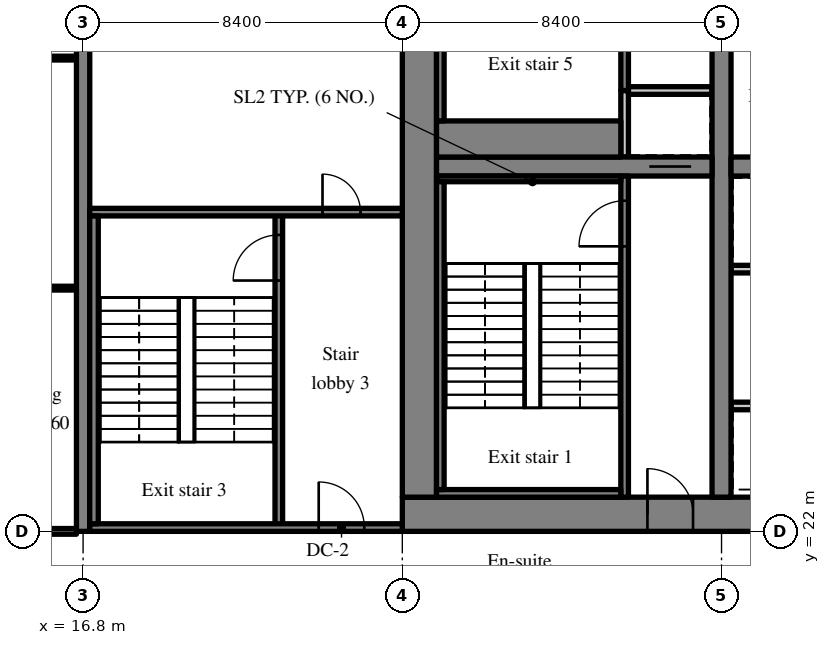
"""IFC4 building model, lengths in metres.
Left out: names, types, materials, properties, quantities, classifications, styles, units other than length and angle.
Written with IfcOpenShell. Run it as: python <this file> out.ifc"""

import sys

from ifc_helpers import new_model, si_unit, direction, frame, frame_2d, origin, place, context, subcontext, project, spatial, rectangle, extrude, source, transform, mapped, element, fill, save


model = new_model("IFC4")
c1 = context("Model", 3, precision=1e-05, world=origin(), true_north=direction((0.0, 1.0)))
c2 = subcontext(c1, "Body", "Model", "MODEL_VIEW")
j1 = project(units=[si_unit("LENGTHUNIT", "METRE"), si_unit("PLANEANGLEUNIT", "RADIAN")], contexts=[c1])
p1 = place(None, origin())
s1 = spatial("IfcSite", under=j1, at=p1, CompositionType="ELEMENT")
p2 = place(p1, origin())
s2 = spatial("IfcBuilding", under=s1, at=p2, CompositionType="ELEMENT")
p3 = place(p2, frame((0.0, 0.0, 133.2)))
s3 = spatial("IfcBuildingStorey", under=s2, at=p3, CompositionType="ELEMENT", Elevation=133.2)
m1 = source(origin(), c2, "Body", "SweptSolid", [
    extrude(rectangle(XDim=50.4, YDim=0.9, at=frame_2d((25.2, 0.0))), origin(), (0.0, 0.0, 1.0), 3.52),
])
p4 = place(p3, frame((25.2, 22.45, 0.0), z_axis=(0.0, 0.0, 1.0), x_axis=(1.0, 0.0, 0.0)))
e1 = element("IfcWall", 1, at=p4, inside=s3, PredefinedType="SHEAR", context=c2, shape_type="MappedRepresentation", body=[
    mapped(m1, transform((0.0, 0.0, 0.0), scale=1.0)),
])
m2 = source(origin(), c2, "Body", "SweptSolid", [
    extrude(rectangle(XDim=1.8, YDim=2.1, at=frame_2d((0.9, 1.05))), frame((0.0, 0.46, 0.0), z_axis=(0.0, -1.0, 0.0), x_axis=(1.0, 0.0, 0.0)), (0.0, 0.0, 1.0), 0.92),
])
p5 = place(p4, frame((15.9, 0.0, 0.0)))
e2 = element("IfcOpeningElement", 2, at=p5, cuts=e1, PredefinedType="OPENING", context=c2, shape_type="MappedRepresentation", body=[
    mapped(m2, transform((0.0, 0.0, 0.0), scale=1.0)),
])
m3 = source(origin(), c2, "Body", "SweptSolid", [
    extrude(rectangle(XDim=1.2, YDim=2.1, at=frame_2d((0.6, 1.05))), frame((0.0, 0.46, 0.0), z_axis=(0.0, -1.0, 0.0), x_axis=(1.0, 0.0, 0.0)), (0.0, 0.0, 1.0), 0.92),
])
p6 = place(p4, frame((26.975, 0.0, 0.0)))
e3 = element("IfcOpeningElement", 3, at=p6, cuts=e1, PredefinedType="OPENING", context=c2, shape_type="MappedRepresentation", body=[
    mapped(m3, transform((0.0, 0.0, 0.0), scale=1.0)),
])
m4 = source(origin(), c2, "Body", "SweptSolid", [
    extrude(rectangle(XDim=0.9, YDim=2.1, at=frame_2d((0.45, 1.05))), frame((0.0, 0.46, 0.0), z_axis=(0.0, -1.0, 0.0), x_axis=(1.0, 0.0, 0.0)), (0.0, 0.0, 1.0), 0.92),
])
p7 = place(p4, frame((34.5, 0.0, 0.0)))
e4 = element("IfcOpeningElement", 4, at=p7, cuts=e1, PredefinedType="OPENING", context=c2, shape_type="MappedRepresentation", body=[
    mapped(m4, transform((0.0, 0.0, 0.0), scale=1.0)),
])
p8 = place(p4, frame((31.5, 0.0, 0.0)))
e5 = element("IfcOpeningElement", 5, at=p8, cuts=e1, PredefinedType="OPENING", context=c2, shape_type="MappedRepresentation", body=[
    mapped(m4, transform((0.0, 0.0, 0.0), scale=1.0)),
])
p9 = place(p4, frame((39.788, 0.0, 0.0)))
e6 = element("IfcOpeningElement", 6, at=p9, cuts=e1, PredefinedType="OPENING", context=c2, shape_type="MappedRepresentation", body=[
    mapped(m4, transform((0.0, 0.0, 0.0), scale=1.0)),
])
p10 = place(p4, frame((36.762, 0.0, 0.0)))
e7 = element("IfcOpeningElement", 7, at=p10, cuts=e1, PredefinedType="OPENING", context=c2, shape_type="MappedRepresentation", body=[
    mapped(m4, transform((0.0, 0.0, 0.0), scale=1.0)),
])
p11 = place(p4, frame((6.45, 0.0, 0.0)))
e8 = element("IfcOpeningElement", 8, at=p11, cuts=e1, PredefinedType="OPENING", context=c2, shape_type="MappedRepresentation", body=[
    mapped(m3, transform((0.0, 0.0, 0.0), scale=1.0)),
])
p12 = place(p4, frame((47.775, 0.0, 0.0)))
e9 = element("IfcOpeningElement", 9, at=p12, cuts=e1, PredefinedType="OPENING", context=c2, shape_type="MappedRepresentation", body=[
    mapped(m3, transform((0.0, 0.0, 0.0), scale=1.0)),
])
m5 = source(origin(), c2, "Body", "SweptSolid", [
    extrude(rectangle(XDim=18.2, YDim=0.9, at=frame_2d((9.1, 0.0))), origin(), (0.0, 0.0, 1.0), 3.52),
])
p13 = place(p3, frame((25.65, 22.9, 0.0), z_axis=(0.0, 0.0, 1.0), x_axis=(0.0, 1.0, 0.0)))
e10 = element("IfcWall", 10, at=p13, inside=s3, PredefinedType="SHEAR", context=c2, shape_type="MappedRepresentation", body=[
    mapped(m5, transform((0.0, 0.0, 0.0), scale=1.0)),
])
m6 = source(origin(), c2, "Body", "SweptSolid", [
    extrude(rectangle(XDim=18.2, YDim=0.5, at=frame_2d((9.1, 0.0))), origin(), (0.0, 0.0, 1.0), 3.52),
])
p14 = place(p3, frame((33.6, 22.9, 0.0), z_axis=(0.0, 0.0, 1.0), x_axis=(0.0, 1.0, 0.0)))
e11 = element("IfcWall", 11, at=p14, inside=s3, PredefinedType="SHEAR", context=c2, shape_type="MappedRepresentation", body=[
    mapped(m6, transform((0.0, 0.0, 0.0), scale=1.0)),
])
m7 = source(origin(), c2, "Body", "SweptSolid", [
    extrude(rectangle(XDim=1.1, YDim=2.1, at=frame_2d((0.55, 1.05))), frame((0.0, 0.26, 0.0), z_axis=(0.0, -1.0, 0.0), x_axis=(1.0, 0.0, 0.0)), (0.0, 0.0, 1.0), 0.52),
])
p15 = place(p14, frame((12.55, 0.0, 0.0)))
e12 = element("IfcOpeningElement", 12, at=p15, cuts=e11, PredefinedType="OPENING", context=c2, shape_type="MappedRepresentation", body=[
    mapped(m7, transform((0.0, 0.0, 0.0), scale=1.0)),
])
m8 = source(origin(), c2, "Body", "SweptSolid", [
    extrude(rectangle(XDim=7.25, YDim=0.5, at=frame_2d((3.625, 0.0))), origin(), (0.0, 0.0, 1.0), 3.52),
])
p16 = place(p3, frame((26.1, 31.6, 0.0), z_axis=(0.0, 0.0, 1.0), x_axis=(1.0, 0.0, 0.0)))
e13 = element("IfcWall", 13, at=p16, inside=s3, PredefinedType="SHEAR", context=c2, shape_type="MappedRepresentation", body=[
    mapped(m8, transform((0.0, 0.0, 0.0), scale=1.0)),
])
p17 = place(p16, frame((5.6, 0.0, 0.0)))
e14 = element("IfcOpeningElement", 14, at=p17, cuts=e13, PredefinedType="OPENING", context=c2, shape_type="MappedRepresentation", body=[
    mapped(m7, transform((0.0, 0.0, 0.0), scale=1.0)),
])
m9 = source(origin(), c2, "Body", "SweptSolid", [
    extrude(rectangle(XDim=16.3, YDim=0.5, at=frame_2d((8.15, 0.0))), origin(), (0.0, 0.0, 1.0), 3.52),
])
p18 = place(p3, frame((33.85, 31.6, 0.0), z_axis=(0.0, 0.0, 1.0), x_axis=(1.0, 0.0, 0.0)))
e15 = element("IfcWall", 15, at=p18, inside=s3, PredefinedType="SHEAR", context=c2, shape_type="MappedRepresentation", body=[
    mapped(m9, transform((0.0, 0.0, 0.0), scale=1.0)),
])
m10 = source(origin(), c2, "Body", "SweptSolid", [
    extrude(rectangle(XDim=1.0, YDim=2.1, at=frame_2d((0.5, 1.05))), frame((0.0, 0.26, 0.0), z_axis=(0.0, -1.0, 0.0), x_axis=(1.0, 0.0, 0.0)), (0.0, 0.0, 1.0), 0.52),
])
p19 = place(p18, frame((14.725, 0.0, 0.0)))
e16 = element("IfcOpeningElement", 16, at=p19, cuts=e15, PredefinedType="OPENING", context=c2, shape_type="MappedRepresentation", body=[
    mapped(m10, transform((0.0, 0.0, 0.0), scale=1.0)),
])
m11 = source(origin(), c2, "Body", "SweptSolid", [
    extrude(rectangle(XDim=20.0, YDim=0.35, at=frame_2d((10.0, 0.0))), origin(), (0.0, 0.0, 1.0), 3.52),
])
p20 = place(p3, frame((16.8, 22.0, 0.0), z_axis=(0.0, 0.0, 1.0), x_axis=(0.0, 1.0, 0.0)))
e17 = element("IfcWall", 17, at=p20, inside=s3, PredefinedType="SHEAR", context=c2, shape_type="MappedRepresentation", body=[
    mapped(m11, transform((0.0, 0.0, 0.0), scale=1.0)),
])
m12 = source(origin(), c2, "Body", "SweptSolid", [
    extrude(rectangle(XDim=6.05, YDim=0.2, at=frame_2d((3.025, 0.0))), origin(), (0.0, 0.0, 1.0), 3.52),
])
p21 = place(p3, frame((33.85, 25.3, 0.0), z_axis=(0.0, 0.0, 1.0), x_axis=(1.0, 0.0, 0.0)))
e18 = element("IfcWall", 18, at=p21, inside=s3, PredefinedType="SOLIDWALL", context=c2, shape_type="MappedRepresentation", body=[
    mapped(m12, transform((0.0, 0.0, 0.0), scale=1.0)),
])
m13 = source(origin(), c2, "Body", "SweptSolid", [
    extrude(rectangle(XDim=1.1, YDim=2.1, at=frame_2d((0.55, 1.05))), frame((0.0, 0.11, 0.0), z_axis=(0.0, -1.0, 0.0), x_axis=(1.0, 0.0, 0.0)), (0.0, 0.0, 1.0), 0.22),
])
p22 = place(p21, frame((1.0, 0.0, 0.0)))
e19 = element("IfcOpeningElement", 19, at=p22, cuts=e18, PredefinedType="OPENING", context=c2, shape_type="MappedRepresentation", body=[
    mapped(m13, transform((0.0, 0.0, 0.0), scale=1.0)),
])
p23 = place(p21, frame((4.0, 0.0, 0.0)))
e20 = element("IfcOpeningElement", 20, at=p23, cuts=e18, PredefinedType="OPENING", context=c2, shape_type="MappedRepresentation", body=[
    mapped(m13, transform((0.0, 0.0, 0.0), scale=1.0)),
])
m14 = source(origin(), c2, "Body", "SweptSolid", [
    extrude(rectangle(XDim=12.05, YDim=0.2, at=frame_2d((6.025, 0.0))), origin(), (0.0, 0.0, 1.0), 3.52),
])
p24 = place(p3, frame((33.85, 28.9, 0.0), z_axis=(0.0, 0.0, 1.0), x_axis=(1.0, 0.0, 0.0)))
e21 = element("IfcWall", 21, at=p24, inside=s3, PredefinedType="SOLIDWALL", context=c2, shape_type="MappedRepresentation", body=[
    mapped(m14, transform((0.0, 0.0, 0.0), scale=1.0)),
])
p25 = place(p24, frame((1.0, 0.0, 0.0)))
e22 = element("IfcOpeningElement", 22, at=p25, cuts=e21, PredefinedType="OPENING", context=c2, shape_type="MappedRepresentation", body=[
    mapped(m13, transform((0.0, 0.0, 0.0), scale=1.0)),
])
p26 = place(p24, frame((4.0, 0.0, 0.0)))
e23 = element("IfcOpeningElement", 23, at=p26, cuts=e21, PredefinedType="OPENING", context=c2, shape_type="MappedRepresentation", body=[
    mapped(m13, transform((0.0, 0.0, 0.0), scale=1.0)),
])
p27 = place(p24, frame((7.0, 0.0, 0.0)))
e24 = element("IfcOpeningElement", 24, at=p27, cuts=e21, PredefinedType="OPENING", context=c2, shape_type="MappedRepresentation", body=[
    mapped(m13, transform((0.0, 0.0, 0.0), scale=1.0)),
])
p28 = place(p24, frame((10.0, 0.0, 0.0)))
e25 = element("IfcOpeningElement", 25, at=p28, cuts=e21, PredefinedType="OPENING", context=c2, shape_type="MappedRepresentation", body=[
    mapped(m13, transform((0.0, 0.0, 0.0), scale=1.0)),
])
m15 = source(origin(), c2, "Body", "SweptSolid", [
    extrude(rectangle(XDim=8.45, YDim=0.2, at=frame_2d((4.225, 0.0))), origin(), (0.0, 0.0, 1.0), 3.52),
])
p29 = place(p3, frame((31.05, 22.9, 0.0), z_axis=(0.0, 0.0, 1.0), x_axis=(0.0, 1.0, 0.0)))
e26 = element("IfcWall", 26, at=p29, inside=s3, PredefinedType="SOLIDWALL", context=c2, shape_type="MappedRepresentation", body=[
    mapped(m15, transform((0.0, 0.0, 0.0), scale=1.0)),
])
m16 = source(origin(), c2, "Body", "SweptSolid", [
    extrude(rectangle(XDim=1.2, YDim=2.1, at=frame_2d((0.6, 1.05))), frame((0.0, 0.11, 0.0), z_axis=(0.0, -1.0, 0.0), x_axis=(1.0, 0.0, 0.0)), (0.0, 0.0, 1.0), 0.22),
])
p30 = place(p29, frame((6.6, 0.0, 0.0)))
e27 = element("IfcOpeningElement", 27, at=p30, cuts=e26, PredefinedType="OPENING", context=c2, shape_type="MappedRepresentation", body=[
    mapped(m16, transform((0.0, 0.0, 0.0), scale=1.0)),
])
m17 = source(origin(), c2, "Body", "SweptSolid", [
    extrude(rectangle(XDim=1.75, YDim=0.2, at=frame_2d((0.875, 0.0))), origin(), (0.0, 0.0, 1.0), 3.52),
])
p31 = place(p3, frame((31.05, 31.85, 0.0), z_axis=(0.0, 0.0, 1.0), x_axis=(0.0, 1.0, 0.0)))
e28 = element("IfcWall", 28, at=p31, inside=s3, PredefinedType="SOLIDWALL", context=c2, shape_type="MappedRepresentation", body=[
    mapped(m17, transform((0.0, 0.0, 0.0), scale=1.0)),
])
m18 = source(origin(), c2, "Body", "SweptSolid", [
    extrude(rectangle(XDim=2.2, YDim=0.2, at=frame_2d((1.1, 0.0))), origin(), (0.0, 0.0, 1.0), 3.52),
])
p32 = place(p3, frame((31.15, 33.6, 0.0), z_axis=(0.0, 0.0, 1.0), x_axis=(1.0, 0.0, 0.0)))
e29 = element("IfcWall", 29, at=p32, inside=s3, PredefinedType="SOLIDWALL", context=c2, shape_type="MappedRepresentation", body=[
    mapped(m18, transform((0.0, 0.0, 0.0), scale=1.0)),
])
m19 = source(origin(), c2, "Body", "SweptSolid", [
    extrude(rectangle(XDim=7.5, YDim=0.2, at=frame_2d((3.75, 0.0))), origin(), (0.0, 0.0, 1.0), 3.52),
])
p33 = place(p3, frame((31.05, 33.6, 0.0), z_axis=(0.0, 0.0, 1.0), x_axis=(0.0, 1.0, 0.0)))
e30 = element("IfcWall", 30, at=p33, inside=s3, PredefinedType="SOLIDWALL", context=c2, shape_type="MappedRepresentation", body=[
    mapped(m19, transform((0.0, 0.0, 0.0), scale=1.0)),
])
m20 = source(origin(), c2, "Body", "SweptSolid", [
    extrude(rectangle(XDim=1.8, YDim=2.1, at=frame_2d((0.9, 1.05))), frame((0.0, 0.11, 0.0), z_axis=(0.0, -1.0, 0.0), x_axis=(1.0, 0.0, 0.0)), (0.0, 0.0, 1.0), 0.22),
])
p34 = place(p33, frame((5.3, 0.0, 0.0)))
e31 = element("IfcOpeningElement", 31, at=p34, cuts=e30, PredefinedType="OPENING", context=c2, shape_type="MappedRepresentation", body=[
    mapped(m20, transform((0.0, 0.0, 0.0), scale=1.0)),
])
m21 = source(origin(), c2, "Body", "SweptSolid", [
    extrude(rectangle(XDim=8.3, YDim=0.2, at=frame_2d((4.15, 0.0))), origin(), (0.0, 0.0, 1.0), 3.52),
])
p35 = place(p3, frame((21.95, 22.1, 0.0), z_axis=(0.0, 0.0, 1.0), x_axis=(0.0, 1.0, 0.0)))
e32 = element("IfcWall", 32, at=p35, inside=s3, PredefinedType="SOLIDWALL", context=c2, shape_type="MappedRepresentation", body=[
    mapped(m21, transform((0.0, 0.0, 0.0), scale=1.0)),
])
p36 = place(p35, frame((6.5, 0.0, 0.0)))
e33 = element("IfcOpeningElement", 33, at=p36, cuts=e32, PredefinedType="OPENING", context=c2, shape_type="MappedRepresentation", body=[
    mapped(m16, transform((0.0, 0.0, 0.0), scale=1.0)),
])
m22 = source(origin(), c2, "Body", "SweptSolid", [
    extrude(rectangle(XDim=8.225, YDim=0.2, at=frame_2d((4.112, 0.0))), origin(), (0.0, 0.0, 1.0), 3.52),
])
p37 = place(p3, frame((16.975, 22.1, 0.0), z_axis=(0.0, 0.0, 1.0), x_axis=(1.0, 0.0, 0.0)))
e34 = element("IfcWall", 34, at=p37, inside=s3, PredefinedType="SOLIDWALL", context=c2, shape_type="MappedRepresentation", body=[
    mapped(m22, transform((0.0, 0.0, 0.0), scale=1.0)),
])
p38 = place(p37, frame((6.025, 0.0, 0.0)))
e35 = element("IfcOpeningElement", 35, at=p38, cuts=e34, PredefinedType="OPENING", context=c2, shape_type="MappedRepresentation", body=[
    mapped(m16, transform((0.0, 0.0, 0.0), scale=1.0)),
])
p39 = place(p3, frame((16.975, 30.4, 0.0), z_axis=(0.0, 0.0, 1.0), x_axis=(1.0, 0.0, 0.0)))
e36 = element("IfcWall", 36, at=p39, inside=s3, PredefinedType="SOLIDWALL", context=c2, shape_type="MappedRepresentation", body=[
    mapped(m22, transform((0.0, 0.0, 0.0), scale=1.0)),
])
m23 = source(origin(), c2, "Body", "SweptSolid", [
    extrude(rectangle(XDim=1.0, YDim=2.1, at=frame_2d((0.5, 1.05))), frame((0.0, 0.11, 0.0), z_axis=(0.0, -1.0, 0.0), x_axis=(1.0, 0.0, 0.0)), (0.0, 0.0, 1.0), 0.22),
])
p40 = place(p39, frame((6.125, 0.0, 0.0)))
e37 = element("IfcOpeningElement", 37, at=p40, cuts=e36, PredefinedType="OPENING", context=c2, shape_type="MappedRepresentation", body=[
    mapped(m23, transform((0.0, 0.0, 0.0), scale=1.0)),
])
m24 = source(origin(), c2, "Body", "SweptSolid", [
    extrude(rectangle(XDim=4.85, YDim=0.2, at=frame_2d((2.425, 0.0))), origin(), (0.0, 0.0, 1.0), 3.52),
])
p41 = place(p3, frame((26.1, 23.0, 0.0), z_axis=(0.0, 0.0, 1.0), x_axis=(1.0, 0.0, 0.0)))
e38 = element("IfcWall", 38, at=p41, inside=s3, PredefinedType="SOLIDWALL", context=c2, shape_type="MappedRepresentation", body=[
    mapped(m24, transform((0.0, 0.0, 0.0), scale=1.0)),
])
m25 = source(origin(), c2, "Body", "SweptSolid", [
    extrude(rectangle(XDim=4.85, YDim=0.15, at=frame_2d((2.425, 0.0))), origin(), (0.0, 0.0, 1.0), 3.52),
])
p42 = place(p3, frame((26.1, 31.275, 0.0), z_axis=(0.0, 0.0, 1.0), x_axis=(1.0, 0.0, 0.0)))
e39 = element("IfcWall", 39, at=p42, inside=s3, PredefinedType="SOLIDWALL", context=c2, shape_type="MappedRepresentation", body=[
    mapped(m25, transform((0.0, 0.0, 0.0), scale=1.0)),
])
m26 = source(origin(), c2, "Body", "SweptSolid", [
    extrude(rectangle(XDim=8.1, YDim=0.2, at=frame_2d((4.05, 0.0))), origin(), (0.0, 0.0, 1.0), 3.52),
])
p43 = place(p3, frame((26.2, 23.1, 0.0), z_axis=(0.0, 0.0, 1.0), x_axis=(0.0, 1.0, 0.0)))
e40 = element("IfcWall", 40, at=p43, inside=s3, PredefinedType="SOLIDWALL", context=c2, shape_type="MappedRepresentation", body=[
    mapped(m26, transform((0.0, 0.0, 0.0), scale=1.0)),
])
m27 = source(origin(), c2, "Body", "SweptSolid", [
    extrude(rectangle(XDim=8.1, YDim=0.225, at=frame_2d((4.05, 0.0))), origin(), (0.0, 0.0, 1.0), 3.52),
])
p44 = place(p3, frame((17.087, 22.2, 0.0), z_axis=(0.0, 0.0, 1.0), x_axis=(0.0, 1.0, 0.0)))
e41 = element("IfcWall", 41, at=p44, inside=s3, PredefinedType="SOLIDWALL", context=c2, shape_type="MappedRepresentation", body=[
    mapped(m27, transform((0.0, 0.0, 0.0), scale=1.0)),
])
m28 = source(origin(), c2, "Body", "SweptSolid", [
    extrude(rectangle(XDim=4.85, YDim=0.95, at=frame_2d((2.425, 0.0))), origin(), (0.0, 0.0, 1.0), 3.52),
])
p45 = place(p3, frame((26.1, 32.325, 0.0), z_axis=(0.0, 0.0, 1.0), x_axis=(1.0, 0.0, 0.0)))
e42 = element("IfcWall", 42, at=p45, inside=s3, PredefinedType="SOLIDWALL", context=c2, shape_type="MappedRepresentation", body=[
    mapped(m28, transform((0.0, 0.0, 0.0), scale=1.0)),
])
p46 = place(p3, frame((26.2, 32.8, 0.0), z_axis=(0.0, 0.0, 1.0), x_axis=(0.0, 1.0, 0.0)))
e43 = element("IfcWall", 43, at=p46, inside=s3, PredefinedType="SOLIDWALL", context=c2, shape_type="MappedRepresentation", body=[
    mapped(m26, transform((0.0, 0.0, 0.0), scale=1.0)),
])
m29 = source(origin(), c2, "Body", "SweptSolid", [
    extrude(rectangle(XDim=2.6, YDim=0.1, at=frame_2d((1.3, 0.0))), origin(), (0.0, 0.0, 1.0), 3.52),
])
p47 = place(p3, frame((14.025, 28.4, 0.0), z_axis=(0.0, 0.0, 1.0), x_axis=(1.0, 0.0, 0.0)))
e44 = element("IfcWall", 44, at=p47, inside=s3, PredefinedType="PARTITIONING", context=c2, shape_type="MappedRepresentation", body=[
    mapped(m29, transform((0.0, 0.0, 0.0), scale=1.0)),
])
m30 = source(origin(), c2, "Body", "SweptSolid", [
    extrude(rectangle(XDim=0.9, YDim=2.1, at=frame_2d((0.45, 1.05))), frame((0.0, 0.06, 0.0), z_axis=(0.0, -1.0, 0.0), x_axis=(1.0, 0.0, 0.0)), (0.0, 0.0, 1.0), 0.12),
])
p48 = place(p47, frame((0.85, 0.0, 0.0)))
e45 = element("IfcOpeningElement", 45, at=p48, cuts=e44, PredefinedType="OPENING", context=c2, shape_type="MappedRepresentation", body=[
    mapped(m30, transform((0.0, 0.0, 0.0), scale=1.0)),
])
m31 = source(origin(), c2, "Body", "SweptSolid", [
    extrude(rectangle(XDim=8.05, YDim=0.1, at=frame_2d((4.025, 0.0))), origin(), (0.0, 0.0, 1.0), 3.52),
])
p49 = place(p3, frame((8.575, 34.453, 0.0), z_axis=(0.0, 0.0, 1.0), x_axis=(1.0, 0.0, 0.0)))
e46 = element("IfcWall", 46, at=p49, inside=s3, PredefinedType="PARTITIONING", context=c2, shape_type="MappedRepresentation", body=[
    mapped(m31, transform((0.0, 0.0, 0.0), scale=1.0)),
])
m32 = source(origin(), c2, "Body", "SweptSolid", [
    extrude(rectangle(XDim=1.8, YDim=2.1, at=frame_2d((0.9, 1.05))), frame((0.0, 0.06, 0.0), z_axis=(0.0, -1.0, 0.0), x_axis=(1.0, 0.0, 0.0)), (0.0, 0.0, 1.0), 0.12),
])
p50 = place(p49, frame((3.125, 0.0, 0.0)))
e47 = element("IfcOpeningElement", 47, at=p50, cuts=e46, PredefinedType="OPENING", context=c2, shape_type="MappedRepresentation", body=[
    mapped(m32, transform((0.0, 0.0, 0.0), scale=1.0)),
])
m33 = source(origin(), c2, "Body", "SweptSolid", [
    extrude(rectangle(XDim=8.05, YDim=0.15, at=frame_2d((4.025, 0.0))), origin(), (0.0, 0.0, 1.0), 2.82),
])
p51 = place(p3, frame((8.575, 22.0, 0.0), z_axis=(0.0, 0.0, 1.0), x_axis=(1.0, 0.0, 0.0)))
e48 = element("IfcWall", 48, at=p51, inside=s3, PredefinedType="PARTITIONING", context=c2, shape_type="MappedRepresentation", body=[
    mapped(m33, transform((0.0, 0.0, 0.0), scale=1.0)),
])
m34 = source(origin(), c2, "Body", "SweptSolid", [
    extrude(rectangle(XDim=1.0, YDim=2.1, at=frame_2d((0.5, 1.05))), frame((0.0, 0.085, 0.0), z_axis=(0.0, -1.0, 0.0), x_axis=(1.0, 0.0, 0.0)), (0.0, 0.0, 1.0), 0.17),
])
p52 = place(p51, frame((0.4, 0.0, 0.0)))
e49 = element("IfcOpeningElement", 49, at=p52, cuts=e48, PredefinedType="OPENING", context=c2, shape_type="MappedRepresentation", body=[
    mapped(m34, transform((0.0, 0.0, 0.0), scale=1.0)),
])
m35 = source(origin(), c2, "Body", "SweptSolid", [
    extrude(rectangle(XDim=1.2, YDim=2.1, at=frame_2d((0.6, 1.05))), frame((0.0, 0.025, 0.0), z_axis=(0.0, -1.0, 0.0), x_axis=(1.0, 0.0, 0.0)), (0.0, 0.0, 1.0), 0.05),
])
p53 = place(p30, origin())
e50 = element("IfcDoor", 50, at=p53, inside=s3, OperationType="SINGLE_SWING_LEFT", PredefinedType="DOOR", context=c2, shape_type="MappedRepresentation", body=[
    mapped(m35, transform((0.0, 0.0, 0.0), scale=1.0)),
])
fill(e27, e50)
m36 = source(origin(), c2, "Body", "SweptSolid", [
    extrude(rectangle(XDim=1.2, YDim=2.1, at=frame_2d((0.6, 1.05))), frame((0.0, 0.375, 0.0), z_axis=(0.0, -1.0, 0.0), x_axis=(1.0, 0.0, 0.0)), (0.0, 0.0, 1.0), 0.05),
])
p54 = place(p11, origin())
e51 = element("IfcDoor", 51, at=p54, inside=s3, OperationType="SINGLE_SWING_LEFT", PredefinedType="DOOR", context=c2, shape_type="MappedRepresentation", body=[
    mapped(m36, transform((0.0, 0.0, 0.0), scale=1.0)),
])
fill(e8, e51)
m37 = source(origin(), c2, "Body", "SweptSolid", [
    extrude(rectangle(XDim=1.1, YDim=2.1, at=frame_2d((0.55, 1.05))), frame((0.0, 0.025, 0.0), z_axis=(0.0, -1.0, 0.0), x_axis=(1.0, 0.0, 0.0)), (0.0, 0.0, 1.0), 0.05),
])
p55 = place(p17, origin())
e52 = element("IfcDoor", 52, at=p55, inside=s3, OperationType="SLIDING_TO_RIGHT", PredefinedType="DOOR", context=c2, shape_type="MappedRepresentation", body=[
    mapped(m37, transform((0.0, 0.0, 0.0), scale=1.0)),
])
fill(e14, e52)
p56 = place(p36, origin())
e53 = element("IfcDoor", 53, at=p56, inside=s3, OperationType="SINGLE_SWING_LEFT", PredefinedType="DOOR", context=c2, shape_type="MappedRepresentation", body=[
    mapped(m35, transform((0.0, 0.0, 0.0), scale=1.0)),
])
fill(e33, e53)
p57 = place(p38, origin())
e54 = element("IfcDoor", 54, at=p57, inside=s3, OperationType="SINGLE_SWING_LEFT", PredefinedType="DOOR", context=c2, shape_type="MappedRepresentation", body=[
    mapped(m35, transform((0.0, 0.0, 0.0), scale=1.0)),
])
fill(e35, e54)
m38 = source(origin(), c2, "Body", "SweptSolid", [
    extrude(rectangle(XDim=1.0, YDim=2.1, at=frame_2d((0.5, 1.05))), frame((0.0, 0.025, 0.0), z_axis=(0.0, -1.0, 0.0), x_axis=(1.0, 0.0, 0.0)), (0.0, 0.0, 1.0), 0.05),
])
p58 = place(p40, origin())
e55 = element("IfcDoor", 55, at=p58, inside=s3, OperationType="SINGLE_SWING_LEFT", PredefinedType="DOOR", context=c2, shape_type="MappedRepresentation", body=[
    mapped(m38, transform((0.0, 0.0, 0.0), scale=1.0)),
])
fill(e37, e55)
save(model, sys.argv[1])
